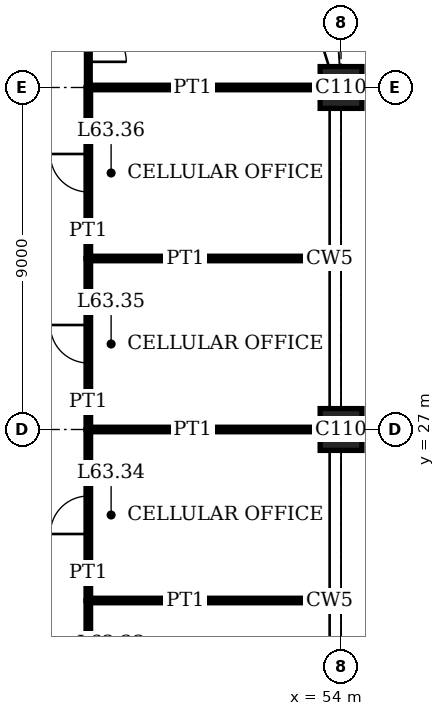
"""IFC4 building model, lengths in metres.
Left out: names, types, materials, properties, quantities, classifications, styles, units other than length and angle.
Written with IfcOpenShell. Run it as: python <this file> out.ifc"""

import sys

from ifc_helpers import new_model, si_unit, direction, frame, frame_2d, origin, origin_2d, place, context, subcontext, project, spatial, rectangle, extrude, element, fill, save


model = new_model("IFC4")
c1 = context("Model", 3, precision=1e-05, world=origin(), true_north=direction((0.0, 1.0)))
c2 = subcontext(c1, "Body", "Model", "MODEL_VIEW")
j1 = project(units=[si_unit("LENGTHUNIT", "METRE"), si_unit("PLANEANGLEUNIT", "RADIAN")], contexts=[c1])
p1 = place(None, origin())
s1 = spatial("IfcSite", under=j1, at=p1, CompositionType="ELEMENT")
p2 = place(p1, origin())
s2 = spatial("IfcBuilding", under=s1, at=p2, CompositionType="ELEMENT")
p3 = place(p2, frame((0.0, 0.0, 259.4)))
s3 = spatial("IfcBuildingStorey", under=s2, at=p3, CompositionType="ELEMENT", Elevation=259.4)
for number, where, z_axis, x_axis in (
    (1, (54.0, 27.0, 0.0), (0.0, 0.0, 1.0), (1.0, 0.0, 0.0)),
    (2, (54.0, 36.0, 0.0), (0.0, 0.0, 1.0), (1.0, 0.0, 0.0)),
):
    element("IfcColumn", number, at=place(p3, frame(where, z_axis=z_axis, x_axis=x_axis)), inside=s3, PredefinedType="COLUMN", context=c2, shape_type="SweptSolid", body=[
        extrude(rectangle(XDim=1.1, YDim=1.1, at=origin_2d()), origin(), (0.0, 0.0, 1.0), 4.0),
    ])
p4 = place(p3, frame((47.35, 22.5, 0.0), z_axis=(0.0, 0.0, 1.0), x_axis=(1.0, 0.0, 0.0)))
e3 = element("IfcWall", 3, at=p4, inside=s3, PredefinedType="PARTITIONING", context=c2, shape_type="SweptSolid", body=[
    extrude(rectangle(XDim=6.34, YDim=0.12, at=frame_2d((3.17, 0.0))), origin(), (0.0, 0.0, 1.0), 3.1),
])
p5 = place(p3, frame((47.35, 27.0, 0.0), z_axis=(0.0, 0.0, 1.0), x_axis=(1.0, 0.0, 0.0)))
e4 = element("IfcWall", 4, at=p5, inside=s3, PredefinedType="PARTITIONING", context=c2, shape_type="SweptSolid", body=[
    extrude(rectangle(XDim=6.1, YDim=0.12, at=frame_2d((3.05, 0.0))), origin(), (0.0, 0.0, 1.0), 3.05),
])
p6 = place(p3, frame((47.35, 31.5, 0.0), z_axis=(0.0, 0.0, 1.0), x_axis=(1.0, 0.0, 0.0)))
e5 = element("IfcWall", 5, at=p6, inside=s3, PredefinedType="PARTITIONING", context=c2, shape_type="SweptSolid", body=[
    extrude(rectangle(XDim=6.34, YDim=0.12, at=frame_2d((3.17, 0.0))), origin(), (0.0, 0.0, 1.0), 3.1),
])
p7 = place(p3, frame((47.35, 36.0, 0.0), z_axis=(0.0, 0.0, 1.0), x_axis=(1.0, 0.0, 0.0)))
e6 = element("IfcWall", 6, at=p7, inside=s3, PredefinedType="PARTITIONING", context=c2, shape_type="SweptSolid", body=[
    extrude(rectangle(XDim=6.1, YDim=0.12, at=frame_2d((3.05, 0.0))), origin(), (0.0, 0.0, 1.0), 3.05),
])
p8 = place(p3, frame((47.35, 18.0, 0.0), z_axis=(0.0, 0.0, 1.0), x_axis=(0.0, 1.0, 0.0)))
e7 = element("IfcWall", 7, at=p8, inside=s3, PredefinedType="PARTITIONING", context=c2, shape_type="SweptSolid", body=[
    extrude(rectangle(XDim=4.5, YDim=0.12, at=frame_2d((2.25, 0.0))), origin(), (0.0, 0.0, 1.0), 3.75),
])
p9 = place(p8, frame((1.75, 0.0, 0.0)))
e8 = element("IfcOpeningElement", 8, at=p9, cuts=e7, PredefinedType="OPENING", context=c2, shape_type="SweptSolid", body=[
    extrude(rectangle(XDim=1.0, YDim=2.4, at=frame_2d((0.5, 1.2))), frame((0.0, 0.07, 0.0), z_axis=(0.0, -1.0, 0.0), x_axis=(1.0, 0.0, 0.0)), (0.0, 0.0, 1.0), 0.14),
])
p10 = place(p3, frame((47.35, 22.5, 0.0), z_axis=(0.0, 0.0, 1.0), x_axis=(0.0, 1.0, 0.0)))
e9 = element("IfcWall", 9, at=p10, inside=s3, PredefinedType="PARTITIONING", context=c2, shape_type="SweptSolid", body=[
    extrude(rectangle(XDim=4.5, YDim=0.12, at=frame_2d((2.25, 0.0))), origin(), (0.0, 0.0, 1.0), 3.75),
])
p11 = place(p10, frame((1.75, 0.0, 0.0)))
e10 = element("IfcOpeningElement", 10, at=p11, cuts=e9, PredefinedType="OPENING", context=c2, shape_type="SweptSolid", body=[
    extrude(rectangle(XDim=1.0, YDim=2.4, at=frame_2d((0.5, 1.2))), frame((0.0, 0.07, 0.0), z_axis=(0.0, -1.0, 0.0), x_axis=(1.0, 0.0, 0.0)), (0.0, 0.0, 1.0), 0.14),
])
p12 = place(p3, frame((47.35, 27.0, 0.0), z_axis=(0.0, 0.0, 1.0), x_axis=(0.0, 1.0, 0.0)))
e11 = element("IfcWall", 11, at=p12, inside=s3, PredefinedType="PARTITIONING", context=c2, shape_type="SweptSolid", body=[
    extrude(rectangle(XDim=4.5, YDim=0.12, at=frame_2d((2.25, 0.0))), origin(), (0.0, 0.0, 1.0), 3.75),
])
p13 = place(p12, frame((1.75, 0.0, 0.0)))
e12 = element("IfcOpeningElement", 12, at=p13, cuts=e11, PredefinedType="OPENING", context=c2, shape_type="SweptSolid", body=[
    extrude(rectangle(XDim=1.0, YDim=2.4, at=frame_2d((0.5, 1.2))), frame((0.0, 0.07, 0.0), z_axis=(0.0, -1.0, 0.0), x_axis=(1.0, 0.0, 0.0)), (0.0, 0.0, 1.0), 0.14),
])
p14 = place(p3, frame((47.35, 31.5, 0.0), z_axis=(0.0, 0.0, 1.0), x_axis=(0.0, 1.0, 0.0)))
e13 = element("IfcWall", 13, at=p14, inside=s3, PredefinedType="PARTITIONING", context=c2, shape_type="SweptSolid", body=[
    extrude(rectangle(XDim=4.5, YDim=0.12, at=frame_2d((2.25, 0.0))), origin(), (0.0, 0.0, 1.0), 3.75),
])
p15 = place(p14, frame((1.75, 0.0, 0.0)))
e14 = element("IfcOpeningElement", 14, at=p15, cuts=e13, PredefinedType="OPENING", context=c2, shape_type="SweptSolid", body=[
    extrude(rectangle(XDim=1.0, YDim=2.4, at=frame_2d((0.5, 1.2))), frame((0.0, 0.07, 0.0), z_axis=(0.0, -1.0, 0.0), x_axis=(1.0, 0.0, 0.0)), (0.0, 0.0, 1.0), 0.14),
])
p16 = place(p3, frame((47.35, 36.0, 0.0), z_axis=(0.0, 0.0, 1.0), x_axis=(0.0, 1.0, 0.0)))
e15 = element("IfcWall", 15, at=p16, inside=s3, PredefinedType="PARTITIONING", context=c2, shape_type="SweptSolid", body=[
    extrude(rectangle(XDim=2.35, YDim=0.1, at=frame_2d((1.175, 0.0))), origin(), (0.0, 0.0, 1.0), 3.75),
])
p17 = place(p16, frame((0.675, 0.0, 0.0)))
e16 = element("IfcOpeningElement", 16, at=p17, cuts=e15, PredefinedType="OPENING", context=c2, shape_type="SweptSolid", body=[
    extrude(rectangle(XDim=1.0, YDim=2.4, at=frame_2d((0.5, 1.2))), frame((0.0, 0.06, 0.0), z_axis=(0.0, -1.0, 0.0), x_axis=(1.0, 0.0, 0.0)), (0.0, 0.0, 1.0), 0.12),
])
p18 = place(p11, origin())
e17 = element("IfcDoor", 17, at=p18, inside=s3, OperationType="SINGLE_SWING_RIGHT", PredefinedType="DOOR", context=c2, shape_type="SweptSolid", body=[
    extrude(rectangle(XDim=1.0, YDim=2.4, at=frame_2d((0.5, 1.2))), frame((0.0, 0.025, 0.0), z_axis=(0.0, -1.0, 0.0), x_axis=(1.0, 0.0, 0.0)), (0.0, 0.0, 1.0), 0.05),
])
fill(e10, e17)
p19 = place(p13, origin())
e18 = element("IfcDoor", 18, at=p19, inside=s3, OperationType="SINGLE_SWING_LEFT", PredefinedType="DOOR", context=c2, shape_type="SweptSolid", body=[
    extrude(rectangle(XDim=1.0, YDim=2.4, at=frame_2d((0.5, 1.2))), frame((0.0, 0.025, 0.0), z_axis=(0.0, -1.0, 0.0), x_axis=(1.0, 0.0, 0.0)), (0.0, 0.0, 1.0), 0.05),
])
fill(e12, e18)
p20 = place(p15, origin())
e19 = element("IfcDoor", 19, at=p20, inside=s3, OperationType="SINGLE_SWING_LEFT", PredefinedType="DOOR", context=c2, shape_type="SweptSolid", body=[
    extrude(rectangle(XDim=1.0, YDim=2.4, at=frame_2d((0.5, 1.2))), frame((0.0, 0.025, 0.0), z_axis=(0.0, -1.0, 0.0), x_axis=(1.0, 0.0, 0.0)), (0.0, 0.0, 1.0), 0.05),
])
fill(e14, e19)
p21 = place(p17, origin())
e20 = element("IfcDoor", 20, at=p21, inside=s3, OperationType="SINGLE_SWING_LEFT", PredefinedType="DOOR", context=c2, shape_type="SweptSolid", body=[
    extrude(rectangle(XDim=1.0, YDim=2.4, at=frame_2d((0.5, 1.2))), frame((0.0, 0.02, 0.0), z_axis=(0.0, -1.0, 0.0), x_axis=(1.0, 0.0, 0.0)), (0.0, 0.0, 1.0), 0.04),
])
fill(e16, e20)
save(model, sys.argv[1])
